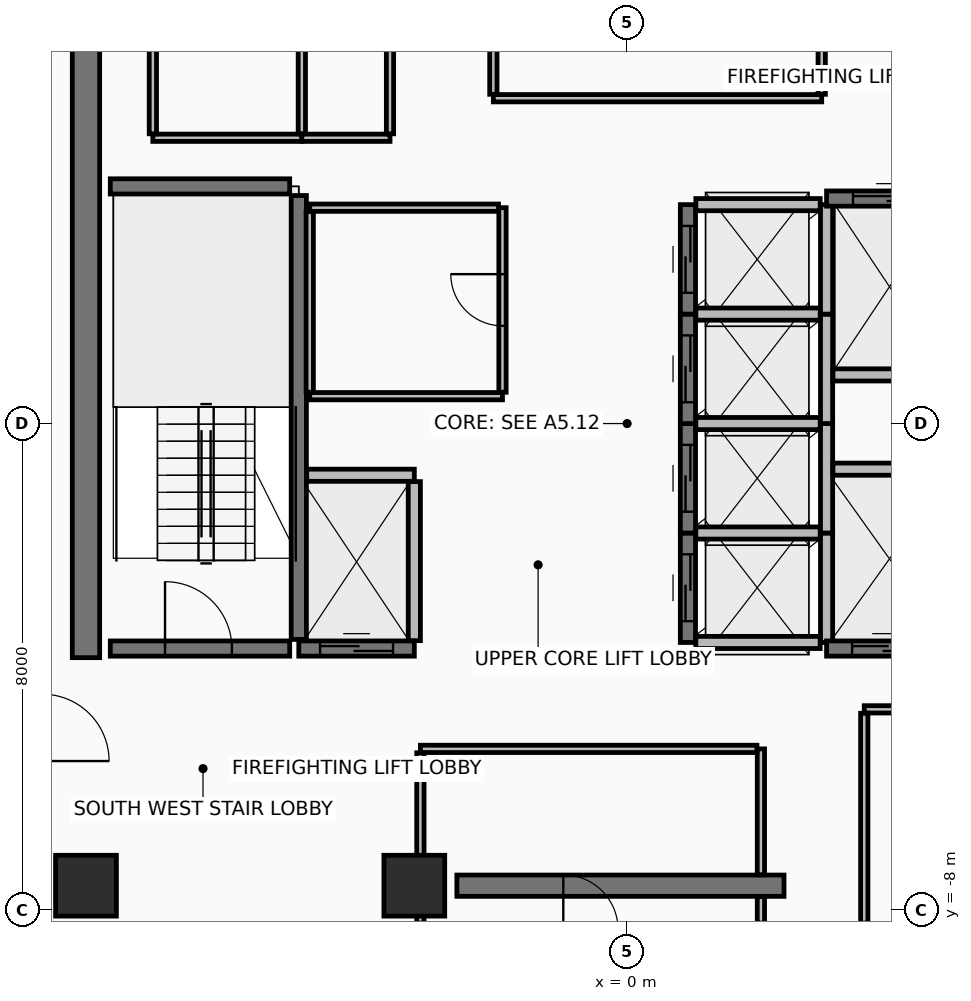
"""IFC4 building model, lengths in metres.
Left out: names, types, materials, properties, quantities, classifications, styles, units other than length and angle.
Written with IfcOpenShell. Run it as: python <this file> out.ifc"""

import sys

from ifc_helpers import new_model, si_unit, direction, frame, frame_2d, origin, origin_2d, place, context, subcontext, project, spatial, rectangle, extrude, element, fill, save


model = new_model("IFC4")
c1 = context("Model", 3, precision=1e-05, world=origin(), true_north=direction((0.0, 1.0)))
c2 = subcontext(c1, "Body", "Model", "MODEL_VIEW")
j1 = project(units=[si_unit("LENGTHUNIT", "METRE"), si_unit("PLANEANGLEUNIT", "RADIAN")], contexts=[c1])
p1 = place(None, origin())
s1 = spatial("IfcSite", under=j1, at=p1, CompositionType="ELEMENT")
p2 = place(p1, origin())
s2 = spatial("IfcBuilding", under=s1, at=p2, CompositionType="ELEMENT")
p3 = place(p2, frame((0.0, 0.0, 267.8)))
s3 = spatial("IfcBuildingStorey", under=s2, at=p3, CompositionType="ELEMENT", Elevation=267.8)
for number, where, z_axis, x_axis in (
    (1, (-8.9, -7.6, 0.0), (0.0, 0.0, 1.0), (1.0, 0.0, 0.0)),
    (2, (-3.5, -7.6, 0.0), (0.0, 0.0, 1.0), (1.0, 0.0, 0.0)),
):
    element("IfcColumn", number, at=place(p3, frame(where, z_axis=z_axis, x_axis=x_axis)), inside=s3, PredefinedType="COLUMN", context=c2, shape_type="SweptSolid", body=[
        extrude(rectangle(XDim=1.0, YDim=1.0, at=origin_2d()), origin(), (0.0, 0.0, 1.0), 3.6),
    ])
p4 = place(p3, frame((-2.8, -7.6, 0.0), z_axis=(0.0, 0.0, 1.0), x_axis=(1.0, 0.0, 0.0)))
e3 = element("IfcWall", 3, at=p4, inside=s3, PredefinedType="SHEAR", context=c2, shape_type="SweptSolid", body=[
    extrude(rectangle(XDim=5.38, YDim=0.35, at=frame_2d((2.69, 0.0))), origin(), (0.0, 0.0, 1.0), 3.42),
])
p5 = place(p3, frame((-8.9, -3.85, 0.0), z_axis=(0.0, 0.0, 1.0), x_axis=(0.0, 1.0, 0.0)))
e4 = element("IfcWall", 4, at=p5, inside=s3, PredefinedType="SHEAR", context=c2, shape_type="SweptSolid", body=[
    extrude(rectangle(XDim=10.7, YDim=0.45, at=frame_2d((5.35, 0.0))), origin(), (0.0, 0.0, 1.0), 3.42),
])
p6 = place(p3, frame((-5.4, -3.55, 0.0), z_axis=(0.0, 0.0, 1.0), x_axis=(0.0, 1.0, 0.0)))
e5 = element("IfcWall", 5, at=p6, inside=s3, PredefinedType="SHEAR", context=c2, shape_type="SweptSolid", body=[
    extrude(rectangle(XDim=7.3, YDim=0.25, at=frame_2d((3.65, 0.0))), origin(), (0.0, 0.0, 1.0), 3.42),
])
p7 = place(p3, frame((-8.5, -3.7, 0.0), z_axis=(0.0, 0.0, 1.0), x_axis=(1.0, 0.0, 0.0)))
e6 = element("IfcWall", 6, at=p7, inside=s3, PredefinedType="SHEAR", context=c2, shape_type="SweptSolid", body=[
    extrude(rectangle(XDim=2.95, YDim=0.25, at=frame_2d((1.475, 0.0))), origin(), (0.0, 0.0, 1.0), 3.42),
])
p8 = place(p7, frame((0.9, 0.0, 0.0)))
e7 = element("IfcOpeningElement", 7, at=p8, cuts=e6, PredefinedType="OPENING", context=c2, shape_type="SweptSolid", body=[
    extrude(rectangle(XDim=1.1, YDim=2.15, at=frame_2d((0.55, 1.075))), frame((0.0, 0.135, 0.0), z_axis=(0.0, -1.0, 0.0), x_axis=(1.0, 0.0, 0.0)), (0.0, 0.0, 1.0), 0.27),
])
p9 = place(p3, frame((-8.5, 3.9, 0.0), z_axis=(0.0, 0.0, 1.0), x_axis=(1.0, 0.0, 0.0)))
e8 = element("IfcWall", 8, at=p9, inside=s3, PredefinedType="SHEAR", context=c2, shape_type="SweptSolid", body=[
    extrude(rectangle(XDim=2.95, YDim=0.25, at=frame_2d((1.475, 0.0))), origin(), (0.0, 0.0, 1.0), 3.42),
])
p10 = place(p3, frame((1.0, -3.6, 0.0), z_axis=(0.0, 0.0, 1.0), x_axis=(0.0, 1.0, 0.0)))
e9 = element("IfcWall", 9, at=p10, inside=s3, PredefinedType="SHEAR", context=c2, shape_type="SweptSolid", body=[
    extrude(rectangle(XDim=1.8, YDim=0.25, at=frame_2d((0.9, 0.0))), origin(), (0.0, 0.0, 1.0), 3.42),
])
p11 = place(p10, frame((0.35, 0.0, 0.0)))
e10 = element("IfcOpeningElement", 10, at=p11, cuts=e9, PredefinedType="OPENING", context=c2, shape_type="SweptSolid", body=[
    extrude(rectangle(XDim=1.1, YDim=2.2, at=frame_2d((0.55, 1.1))), frame((0.0, 0.135, 0.0), z_axis=(0.0, -1.0, 0.0), x_axis=(1.0, 0.0, 0.0)), (0.0, 0.0, 1.0), 0.27),
])
p12 = place(p3, frame((3.28, -3.6, 0.0), z_axis=(0.0, 0.0, 1.0), x_axis=(0.0, 1.0, 0.0)))
e11 = element("IfcWall", 11, at=p12, inside=s3, PredefinedType="PARTITIONING", context=c2, shape_type="SweptSolid", body=[
    extrude(rectangle(XDim=1.8, YDim=0.2, at=frame_2d((0.9, 0.0))), origin(), (0.0, 0.0, 1.0), 3.42),
])
for number, where, z_axis, x_axis in (
    (12, (1.13, -3.6, 0.0), (0.0, 0.0, 1.0), (1.0, 0.0, 0.0)),
    (13, (1.13, -1.8, 0.0), (0.0, 0.0, 1.0), (1.0, 0.0, 0.0)),
):
    element("IfcWall", number, at=place(p3, frame(where, z_axis=z_axis, x_axis=x_axis)), inside=s3, PredefinedType="PARTITIONING", context=c2, shape_type="SweptSolid", body=[
        extrude(rectangle(XDim=2.045, YDim=0.2, at=frame_2d((1.022, 0.0))), origin(), (0.0, 0.0, 1.0), 3.42),
    ])
p13 = place(p3, frame((1.0, -1.8, 0.0), z_axis=(0.0, 0.0, 1.0), x_axis=(0.0, 1.0, 0.0)))
e14 = element("IfcWall", 14, at=p13, inside=s3, PredefinedType="SHEAR", context=c2, shape_type="SweptSolid", body=[
    extrude(rectangle(XDim=1.8, YDim=0.25, at=frame_2d((0.9, 0.0))), origin(), (0.0, 0.0, 1.0), 3.42),
])
p14 = place(p13, frame((0.35, 0.0, 0.0)))
e15 = element("IfcOpeningElement", 15, at=p14, cuts=e14, PredefinedType="OPENING", context=c2, shape_type="SweptSolid", body=[
    extrude(rectangle(XDim=1.1, YDim=2.2, at=frame_2d((0.55, 1.1))), frame((0.0, 0.135, 0.0), z_axis=(0.0, -1.0, 0.0), x_axis=(1.0, 0.0, 0.0)), (0.0, 0.0, 1.0), 0.27),
])
p15 = place(p3, frame((3.28, -1.8, 0.0), z_axis=(0.0, 0.0, 1.0), x_axis=(0.0, 1.0, 0.0)))
e16 = element("IfcWall", 16, at=p15, inside=s3, PredefinedType="PARTITIONING", context=c2, shape_type="SweptSolid", body=[
    extrude(rectangle(XDim=1.8, YDim=0.2, at=frame_2d((0.9, 0.0))), origin(), (0.0, 0.0, 1.0), 3.42),
])
p16 = place(p3, frame((1.13, 0.0, 0.0), z_axis=(0.0, 0.0, 1.0), x_axis=(1.0, 0.0, 0.0)))
e17 = element("IfcWall", 17, at=p16, inside=s3, PredefinedType="PARTITIONING", context=c2, shape_type="SweptSolid", body=[
    extrude(rectangle(XDim=2.045, YDim=0.2, at=frame_2d((1.022, 0.0))), origin(), (0.0, 0.0, 1.0), 3.42),
])
p17 = place(p3, frame((1.0, 0.0, 0.0), z_axis=(0.0, 0.0, 1.0), x_axis=(0.0, 1.0, 0.0)))
e18 = element("IfcWall", 18, at=p17, inside=s3, PredefinedType="SHEAR", context=c2, shape_type="SweptSolid", body=[
    extrude(rectangle(XDim=1.8, YDim=0.25, at=frame_2d((0.9, 0.0))), origin(), (0.0, 0.0, 1.0), 3.42),
])
p18 = place(p17, frame((0.35, 0.0, 0.0)))
e19 = element("IfcOpeningElement", 19, at=p18, cuts=e18, PredefinedType="OPENING", context=c2, shape_type="SweptSolid", body=[
    extrude(rectangle(XDim=1.1, YDim=2.2, at=frame_2d((0.55, 1.1))), frame((0.0, 0.135, 0.0), z_axis=(0.0, -1.0, 0.0), x_axis=(1.0, 0.0, 0.0)), (0.0, 0.0, 1.0), 0.27),
])
p19 = place(p3, frame((3.28, 0.0, 0.0), z_axis=(0.0, 0.0, 1.0), x_axis=(0.0, 1.0, 0.0)))
e20 = element("IfcWall", 20, at=p19, inside=s3, PredefinedType="PARTITIONING", context=c2, shape_type="SweptSolid", body=[
    extrude(rectangle(XDim=1.8, YDim=0.2, at=frame_2d((0.9, 0.0))), origin(), (0.0, 0.0, 1.0), 3.42),
])
p20 = place(p3, frame((1.13, 1.8, 0.0), z_axis=(0.0, 0.0, 1.0), x_axis=(1.0, 0.0, 0.0)))
e21 = element("IfcWall", 21, at=p20, inside=s3, PredefinedType="PARTITIONING", context=c2, shape_type="SweptSolid", body=[
    extrude(rectangle(XDim=2.045, YDim=0.2, at=frame_2d((1.022, 0.0))), origin(), (0.0, 0.0, 1.0), 3.42),
])
p21 = place(p3, frame((1.0, 1.8, 0.0), z_axis=(0.0, 0.0, 1.0), x_axis=(0.0, 1.0, 0.0)))
e22 = element("IfcWall", 22, at=p21, inside=s3, PredefinedType="SHEAR", context=c2, shape_type="SweptSolid", body=[
    extrude(rectangle(XDim=1.8, YDim=0.25, at=frame_2d((0.9, 0.0))), origin(), (0.0, 0.0, 1.0), 3.42),
])
p22 = place(p21, frame((0.35, 0.0, 0.0)))
e23 = element("IfcOpeningElement", 23, at=p22, cuts=e22, PredefinedType="OPENING", context=c2, shape_type="SweptSolid", body=[
    extrude(rectangle(XDim=1.1, YDim=2.2, at=frame_2d((0.55, 1.1))), frame((0.0, 0.135, 0.0), z_axis=(0.0, -1.0, 0.0), x_axis=(1.0, 0.0, 0.0)), (0.0, 0.0, 1.0), 0.27),
])
p23 = place(p3, frame((3.28, 1.8, 0.0), z_axis=(0.0, 0.0, 1.0), x_axis=(0.0, 1.0, 0.0)))
e24 = element("IfcWall", 24, at=p23, inside=s3, PredefinedType="PARTITIONING", context=c2, shape_type="SweptSolid", body=[
    extrude(rectangle(XDim=1.8, YDim=0.2, at=frame_2d((0.9, 0.0))), origin(), (0.0, 0.0, 1.0), 3.42),
])
p24 = place(p3, frame((1.13, 3.6, 0.0), z_axis=(0.0, 0.0, 1.0), x_axis=(1.0, 0.0, 0.0)))
e25 = element("IfcWall", 25, at=p24, inside=s3, PredefinedType="PARTITIONING", context=c2, shape_type="SweptSolid", body=[
    extrude(rectangle(XDim=2.045, YDim=0.2, at=frame_2d((1.022, 0.0))), origin(), (0.0, 0.0, 1.0), 2.715),
])
p25 = place(p3, frame((-5.4, -3.7, 0.0), z_axis=(0.0, 0.0, 1.0), x_axis=(1.0, 0.0, 0.0)))
e26 = element("IfcWall", 26, at=p25, inside=s3, PredefinedType="SHEAR", context=c2, shape_type="SweptSolid", body=[
    extrude(rectangle(XDim=1.9, YDim=0.25, at=frame_2d((0.95, 0.0))), origin(), (0.0, 0.0, 1.0), 3.42),
])
p26 = place(p25, frame((0.35, 0.0, 0.0)))
e27 = element("IfcOpeningElement", 27, at=p26, cuts=e26, PredefinedType="OPENING", context=c2, shape_type="SweptSolid", body=[
    extrude(rectangle(XDim=1.2, YDim=2.2, at=frame_2d((0.6, 1.1))), frame((0.0, 0.135, 0.0), z_axis=(0.0, -1.0, 0.0), x_axis=(1.0, 0.0, 0.0)), (0.0, 0.0, 1.0), 0.27),
])
p27 = place(p3, frame((-5.27, -0.85, 0.0), z_axis=(0.0, 0.0, 1.0), x_axis=(1.0, 0.0, 0.0)))
e28 = element("IfcWall", 28, at=p27, inside=s3, PredefinedType="PARTITIONING", context=c2, shape_type="SweptSolid", body=[
    extrude(rectangle(XDim=1.77, YDim=0.2, at=frame_2d((0.885, 0.0))), origin(), (0.0, 0.0, 1.0), 3.42),
])
p28 = place(p3, frame((-3.5, -3.57, 0.0), z_axis=(0.0, 0.0, 1.0), x_axis=(0.0, 1.0, 0.0)))
e29 = element("IfcWall", 29, at=p28, inside=s3, PredefinedType="PARTITIONING", context=c2, shape_type="SweptSolid", body=[
    extrude(rectangle(XDim=2.615, YDim=0.2, at=frame_2d((1.308, 0.0))), origin(), (0.0, 0.0, 1.0), 3.42),
])
p29 = place(p3, frame((3.28, 3.7, 0.0), z_axis=(0.0, 0.0, 1.0), x_axis=(1.0, 0.0, 0.0)))
e30 = element("IfcWall", 30, at=p29, inside=s3, PredefinedType="SHEAR", context=c2, shape_type="SweptSolid", body=[
    extrude(rectangle(XDim=2.07, YDim=0.25, at=frame_2d((1.035, 0.0))), origin(), (0.0, 0.0, 1.0), 3.42),
])
p30 = place(p29, frame((0.435, 0.0, 0.0)))
e31 = element("IfcOpeningElement", 31, at=p30, cuts=e30, PredefinedType="OPENING", context=c2, shape_type="SweptSolid", body=[
    extrude(rectangle(XDim=1.2, YDim=2.2, at=frame_2d((0.6, 1.1))), frame((0.0, 0.135, 0.0), z_axis=(0.0, -1.0, 0.0), x_axis=(1.0, 0.0, 0.0)), (0.0, 0.0, 1.0), 0.27),
])
p31 = place(p3, frame((3.385, 0.8, 0.0), z_axis=(0.0, 0.0, 1.0), x_axis=(1.0, 0.0, 0.0)))
e32 = element("IfcWall", 32, at=p31, inside=s3, PredefinedType="PARTITIONING", context=c2, shape_type="SweptSolid", body=[
    extrude(rectangle(XDim=1.835, YDim=0.2, at=frame_2d((0.917, 0.0))), origin(), (0.0, 0.0, 1.0), 3.42),
])
p32 = place(p3, frame((3.28, -3.7, 0.0), z_axis=(0.0, 0.0, 1.0), x_axis=(1.0, 0.0, 0.0)))
e33 = element("IfcWall", 33, at=p32, inside=s3, PredefinedType="SHEAR", context=c2, shape_type="SweptSolid", body=[
    extrude(rectangle(XDim=1.94, YDim=0.25, at=frame_2d((0.97, 0.0))), origin(), (0.0, 0.0, 1.0), 3.42),
])
p33 = place(p32, frame((0.42, 0.0, 0.0)))
e34 = element("IfcOpeningElement", 34, at=p33, cuts=e33, PredefinedType="OPENING", context=c2, shape_type="SweptSolid", body=[
    extrude(rectangle(XDim=1.1, YDim=2.2, at=frame_2d((0.55, 1.1))), frame((0.0, 0.135, 0.0), z_axis=(0.0, -1.0, 0.0), x_axis=(1.0, 0.0, 0.0)), (0.0, 0.0, 1.0), 0.27),
])
p34 = place(p3, frame((3.385, -0.75, 0.0), z_axis=(0.0, 0.0, 1.0), x_axis=(1.0, 0.0, 0.0)))
e35 = element("IfcWall", 35, at=p34, inside=s3, PredefinedType="PARTITIONING", context=c2, shape_type="SweptSolid", body=[
    extrude(rectangle(XDim=1.835, YDim=0.2, at=frame_2d((0.917, 0.0))), origin(), (0.0, 0.0, 1.0), 3.42),
])
p35 = place(p3, frame((-5.22, 0.45, 0.0), z_axis=(0.0, 0.0, 1.0), x_axis=(1.0, 0.0, 0.0)))
e36 = element("IfcWall", 36, at=p35, inside=s3, PredefinedType="PARTITIONING", context=c2, shape_type="SweptSolid", body=[
    extrude(rectangle(XDim=3.17, YDim=0.12, at=frame_2d((1.585, 0.0))), origin(), (0.0, 0.0, 1.0), 3.42),
])
p36 = place(p3, frame((-2.05, 0.515, 0.0), z_axis=(0.0, 0.0, 1.0), x_axis=(0.0, 1.0, 0.0)))
e37 = element("IfcWall", 37, at=p36, inside=s3, PredefinedType="PARTITIONING", context=c2, shape_type="SweptSolid", body=[
    extrude(rectangle(XDim=3.035, YDim=0.12, at=frame_2d((1.518, 0.0))), origin(), (0.0, 0.0, 1.0), 3.42),
])
p37 = place(p36, frame((1.092, 0.0, 0.0)))
e38 = element("IfcOpeningElement", 38, at=p37, cuts=e37, PredefinedType="OPENING", context=c2, shape_type="SweptSolid", body=[
    extrude(rectangle(XDim=0.85, YDim=2.1, at=frame_2d((0.425, 1.05))), frame((0.0, 0.07, 0.0), z_axis=(0.0, -1.0, 0.0), x_axis=(1.0, 0.0, 0.0)), (0.0, 0.0, 1.0), 0.14),
])
p38 = place(p3, frame((-2.115, 3.55, 0.0), z_axis=(0.0, 0.0, 1.0), x_axis=(-1.0, 0.0, 0.0)))
e39 = element("IfcWall", 39, at=p38, inside=s3, PredefinedType="PARTITIONING", context=c2, shape_type="SweptSolid", body=[
    extrude(rectangle(XDim=3.105, YDim=0.12, at=frame_2d((1.552, 0.0))), origin(), (0.0, 0.0, 1.0), 3.42),
])
p39 = place(p3, frame((-5.22, 3.485, 0.0), z_axis=(0.0, 0.0, 1.0), x_axis=(0.0, -1.0, 0.0)))
e40 = element("IfcWall", 40, at=p39, inside=s3, PredefinedType="PARTITIONING", context=c2, shape_type="SweptSolid", body=[
    extrude(rectangle(XDim=2.97, YDim=0.12, at=frame_2d((1.485, 0.0))), origin(), (0.0, 0.0, 1.0), 3.42),
])
p40 = place(p3, frame((2.2, -8.215, 0.0), z_axis=(0.0, 0.0, 1.0), x_axis=(0.0, 1.0, 0.0)))
e41 = element("IfcWall", 41, at=p40, inside=s3, PredefinedType="PARTITIONING", context=c2, shape_type="SweptSolid", body=[
    extrude(rectangle(XDim=0.435, YDim=0.12, at=frame_2d((0.218, 0.0))), origin(), (0.0, 0.0, 1.0), 2.715),
])
p41 = place(p3, frame((2.2, -7.42, 0.0), z_axis=(0.0, 0.0, 1.0), x_axis=(0.0, 1.0, 0.0)))
e42 = element("IfcWall", 42, at=p41, inside=s3, PredefinedType="PARTITIONING", context=c2, shape_type="SweptSolid", body=[
    extrude(rectangle(XDim=2.07, YDim=0.12, at=frame_2d((1.035, 0.0))), origin(), (0.0, 0.0, 1.0), 2.715),
])
p42 = place(p3, frame((2.135, -5.35, 0.0), z_axis=(0.0, 0.0, 1.0), x_axis=(-1.0, 0.0, 0.0)))
e43 = element("IfcWall", 43, at=p42, inside=s3, PredefinedType="PARTITIONING", context=c2, shape_type="SweptSolid", body=[
    extrude(rectangle(XDim=5.535, YDim=0.12, at=frame_2d((2.768, 0.0))), origin(), (0.0, 0.0, 1.0), 2.715),
])
p43 = place(p3, frame((-3.4, -5.415, 0.0), z_axis=(0.0, 0.0, 1.0), x_axis=(0.0, -1.0, 0.0)))
e44 = element("IfcWall", 44, at=p43, inside=s3, PredefinedType="PARTITIONING", context=c2, shape_type="SweptSolid", body=[
    extrude(rectangle(XDim=2.8, YDim=0.12, at=frame_2d((1.4, 0.0))), origin(), (0.0, 0.0, 1.0), 2.715),
])
p44 = place(p3, frame((-2.2, 5.35, 0.0), z_axis=(0.0, 0.0, 1.0), x_axis=(1.0, 0.0, 0.0)))
e45 = element("IfcWall", 45, at=p44, inside=s3, PredefinedType="PARTITIONING", context=c2, shape_type="SweptSolid", body=[
    extrude(rectangle(XDim=5.4, YDim=0.12, at=frame_2d((2.7, 0.0))), origin(), (0.0, 0.0, 1.0), 2.715),
])
p45 = place(p3, frame((3.2, 5.415, 0.0), z_axis=(0.0, 0.0, 1.0), x_axis=(0.0, 1.0, 0.0)))
e46 = element("IfcWall", 46, at=p45, inside=s3, PredefinedType="PARTITIONING", context=c2, shape_type="SweptSolid", body=[
    extrude(rectangle(XDim=2.8, YDim=0.12, at=frame_2d((1.4, 0.0))), origin(), (0.0, 0.0, 1.0), 2.715),
])
p46 = place(p3, frame((-2.2, 7.42, 0.0), z_axis=(0.0, 0.0, 1.0), x_axis=(0.0, -1.0, 0.0)))
e47 = element("IfcWall", 47, at=p46, inside=s3, PredefinedType="PARTITIONING", context=c2, shape_type="SweptSolid", body=[
    extrude(rectangle(XDim=2.005, YDim=0.12, at=frame_2d((1.002, 0.0))), origin(), (0.0, 0.0, 1.0), 2.715),
])
p47 = place(p3, frame((-7.8, 4.7, 0.0), z_axis=(0.0, 0.0, 1.0), x_axis=(1.0, 0.0, 0.0)))
e48 = element("IfcWall", 48, at=p47, inside=s3, PredefinedType="PARTITIONING", context=c2, shape_type="SweptSolid", body=[
    extrude(rectangle(XDim=2.45, YDim=0.12, at=frame_2d((1.225, 0.0))), origin(), (0.0, 0.0, 1.0), 3.42),
])
for number, where, z_axis, x_axis in (
    (49, (-5.35, 4.765, 0.0), (0.0, 0.0, 1.0), (0.0, 1.0, 0.0)),
    (50, (-7.8, 8.215, 0.0), (0.0, 0.0, 1.0), (0.0, -1.0, 0.0)),
):
    element("IfcWall", number, at=place(p3, frame(where, z_axis=z_axis, x_axis=x_axis)), inside=s3, PredefinedType="PARTITIONING", context=c2, shape_type="SweptSolid", body=[
        extrude(rectangle(XDim=3.45, YDim=0.12, at=frame_2d((1.725, 0.0))), origin(), (0.0, 0.0, 1.0), 2.715),
    ])
p48 = place(p3, frame((-5.35, 4.7, 0.0), z_axis=(0.0, 0.0, 1.0), x_axis=(1.0, 0.0, 0.0)))
e51 = element("IfcWall", 51, at=p48, inside=s3, PredefinedType="PARTITIONING", context=c2, shape_type="SweptSolid", body=[
    extrude(rectangle(XDim=1.45, YDim=0.12, at=frame_2d((0.725, 0.0))), origin(), (0.0, 0.0, 1.0), 3.42),
])
p49 = place(p3, frame((-3.9, 4.765, 0.0), z_axis=(0.0, 0.0, 1.0), x_axis=(0.0, 1.0, 0.0)))
e52 = element("IfcWall", 52, at=p49, inside=s3, PredefinedType="PARTITIONING", context=c2, shape_type="SweptSolid", body=[
    extrude(rectangle(XDim=3.45, YDim=0.12, at=frame_2d((1.725, 0.0))), origin(), (0.0, 0.0, 1.0), 2.715),
])
p50 = place(p3, frame((5.785, -4.7, 0.0), z_axis=(0.0, 0.0, 1.0), x_axis=(-1.0, 0.0, 0.0)))
e53 = element("IfcWall", 53, at=p50, inside=s3, PredefinedType="PARTITIONING", context=c2, shape_type="SweptSolid", body=[
    extrude(rectangle(XDim=1.885, YDim=0.12, at=frame_2d((0.942, 0.0))), origin(), (0.0, 0.0, 1.0), 3.42),
])
p51 = place(p3, frame((3.9, -4.765, 0.0), z_axis=(0.0, 0.0, 1.0), x_axis=(0.0, -1.0, 0.0)))
e54 = element("IfcWall", 54, at=p51, inside=s3, PredefinedType="PARTITIONING", context=c2, shape_type="SweptSolid", body=[
    extrude(rectangle(XDim=3.45, YDim=0.12, at=frame_2d((1.725, 0.0))), origin(), (0.0, 0.0, 1.0), 2.715),
])
p52 = place(p8, origin())
e55 = element("IfcDoor", 55, at=p52, inside=s3, OperationType="SINGLE_SWING_LEFT", PredefinedType="DOOR", context=c2, shape_type="SweptSolid", body=[
    extrude(rectangle(XDim=1.1, YDim=2.15, at=frame_2d((0.55, 1.075))), frame((0.0, 0.025, 0.0), z_axis=(0.0, -1.0, 0.0), x_axis=(1.0, 0.0, 0.0)), (0.0, 0.0, 1.0), 0.05),
])
fill(e7, e55)
p53 = place(p11, origin())
e56 = element("IfcDoor", 56, at=p53, inside=s3, OperationType="SLIDING_TO_LEFT", PredefinedType="DOOR", context=c2, shape_type="SweptSolid", body=[
    extrude(rectangle(XDim=1.1, YDim=2.2, at=frame_2d((0.55, 1.1))), frame((0.0, 0.025, 0.0), z_axis=(0.0, -1.0, 0.0), x_axis=(1.0, 0.0, 0.0)), (0.0, 0.0, 1.0), 0.05),
])
fill(e10, e56)
p54 = place(p14, origin())
e57 = element("IfcDoor", 57, at=p54, inside=s3, OperationType="SLIDING_TO_LEFT", PredefinedType="DOOR", context=c2, shape_type="SweptSolid", body=[
    extrude(rectangle(XDim=1.1, YDim=2.2, at=frame_2d((0.55, 1.1))), frame((0.0, 0.025, 0.0), z_axis=(0.0, -1.0, 0.0), x_axis=(1.0, 0.0, 0.0)), (0.0, 0.0, 1.0), 0.05),
])
fill(e15, e57)
p55 = place(p18, origin())
e58 = element("IfcDoor", 58, at=p55, inside=s3, OperationType="SLIDING_TO_LEFT", PredefinedType="DOOR", context=c2, shape_type="SweptSolid", body=[
    extrude(rectangle(XDim=1.1, YDim=2.2, at=frame_2d((0.55, 1.1))), frame((0.0, 0.025, 0.0), z_axis=(0.0, -1.0, 0.0), x_axis=(1.0, 0.0, 0.0)), (0.0, 0.0, 1.0), 0.05),
])
fill(e19, e58)
p56 = place(p22, origin())
e59 = element("IfcDoor", 59, at=p56, inside=s3, OperationType="SLIDING_TO_LEFT", PredefinedType="DOOR", context=c2, shape_type="SweptSolid", body=[
    extrude(rectangle(XDim=1.1, YDim=2.2, at=frame_2d((0.55, 1.1))), frame((0.0, 0.025, 0.0), z_axis=(0.0, -1.0, 0.0), x_axis=(1.0, 0.0, 0.0)), (0.0, 0.0, 1.0), 0.05),
])
fill(e23, e59)
p57 = place(p26, origin())
e60 = element("IfcDoor", 60, at=p57, inside=s3, OperationType="SLIDING_TO_RIGHT", PredefinedType="DOOR", context=c2, shape_type="SweptSolid", body=[
    extrude(rectangle(XDim=1.2, YDim=2.2, at=frame_2d((0.6, 1.1))), frame((0.0, 0.025, 0.0), z_axis=(0.0, -1.0, 0.0), x_axis=(1.0, 0.0, 0.0)), (0.0, 0.0, 1.0), 0.05),
])
fill(e27, e60)
p58 = place(p30, origin())
e61 = element("IfcDoor", 61, at=p58, inside=s3, OperationType="SLIDING_TO_RIGHT", PredefinedType="DOOR", context=c2, shape_type="SweptSolid", body=[
    extrude(rectangle(XDim=1.2, YDim=2.2, at=frame_2d((0.6, 1.1))), frame((0.0, 0.025, 0.0), z_axis=(0.0, -1.0, 0.0), x_axis=(1.0, 0.0, 0.0)), (0.0, 0.0, 1.0), 0.05),
])
fill(e31, e61)
p59 = place(p33, origin())
e62 = element("IfcDoor", 62, at=p59, inside=s3, OperationType="SLIDING_TO_LEFT", PredefinedType="DOOR", context=c2, shape_type="SweptSolid", body=[
    extrude(rectangle(XDim=1.1, YDim=2.2, at=frame_2d((0.55, 1.1))), frame((0.0, 0.025, 0.0), z_axis=(0.0, -1.0, 0.0), x_axis=(1.0, 0.0, 0.0)), (0.0, 0.0, 1.0), 0.05),
])
fill(e34, e62)
p60 = place(p37, frame((0.85, 0.0, 0.0), z_axis=(0.0, 0.0, 1.0), x_axis=(-1.0, 0.0, 0.0)))
e63 = element("IfcDoor", 63, at=p60, inside=s3, OperationType="SINGLE_SWING_RIGHT", PredefinedType="DOOR", context=c2, shape_type="SweptSolid", body=[
    extrude(rectangle(XDim=0.85, YDim=2.1, at=frame_2d((0.425, 1.05))), frame((0.0, 0.025, 0.0), z_axis=(0.0, -1.0, 0.0), x_axis=(1.0, 0.0, 0.0)), (0.0, 0.0, 1.0), 0.05),
])
fill(e38, e63)
save(model, sys.argv[1])
